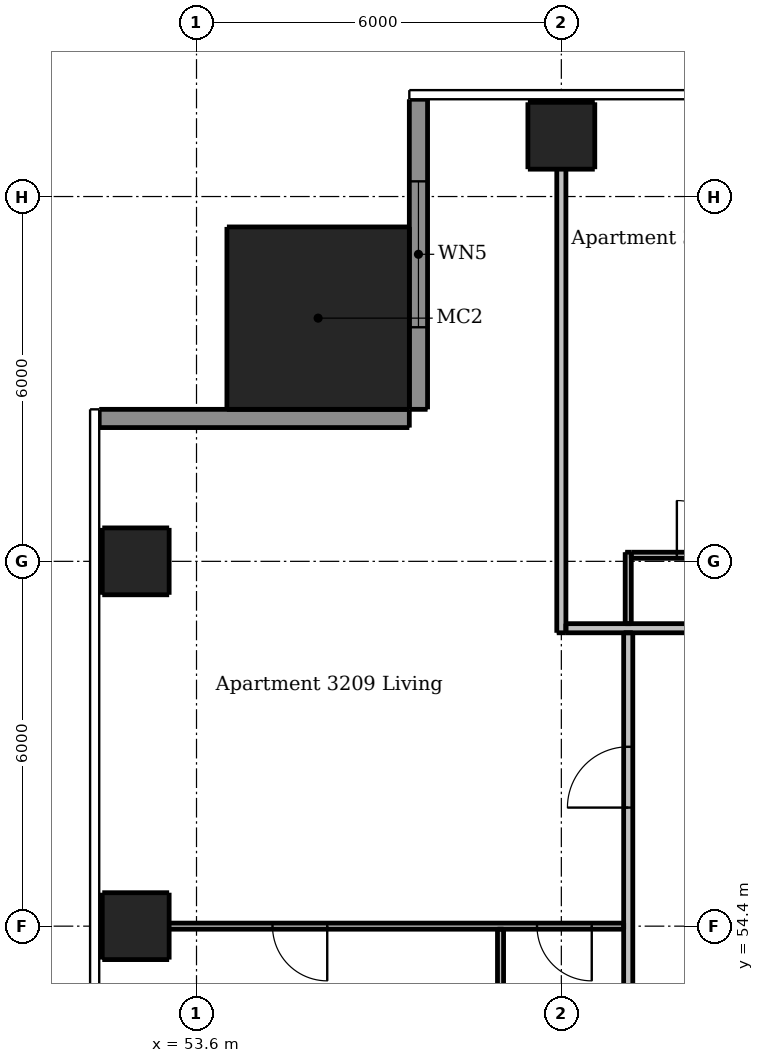
"""IFC4 building model, lengths in metres.
Left out: names, types, materials, properties, quantities, classifications, styles, units other than length and angle.
Written with IfcOpenShell. Run it as: python <this file> out.ifc"""

import sys

from ifc_helpers import new_model, si_unit, direction, frame, frame_2d, origin, origin_2d, place, context, subcontext, project, spatial, rectangle, extrude, element, fill, save


model = new_model("IFC4")
c1 = context("Model", 3, precision=1e-05, world=origin(), true_north=direction((0.0, 1.0)))
c2 = subcontext(c1, "Body", "Model", "MODEL_VIEW")
j1 = project(units=[si_unit("LENGTHUNIT", "METRE"), si_unit("PLANEANGLEUNIT", "RADIAN")], contexts=[c1])
p1 = place(None, origin())
s1 = spatial("IfcSite", under=j1, at=p1, CompositionType="ELEMENT")
p2 = place(p1, origin())
s2 = spatial("IfcBuilding", under=s1, at=p2, CompositionType="ELEMENT")
p3 = place(p2, frame((0.0, 0.0, 118.3)))
s3 = spatial("IfcBuildingStorey", under=s2, at=p3, CompositionType="ELEMENT", Elevation=118.3)
for number, where, z_axis, x_axis in (
    (1, (59.6, 67.4, 0.0), (0.0, 0.0, 1.0), (1.0, 0.0, 0.0)),
    (2, (52.6, 54.4, 0.0), (0.0, 0.0, 1.0), (1.0, 0.0, 0.0)),
    (3, (52.6, 60.4, 0.0), (0.0, 0.0, 1.0), (1.0, 0.0, 0.0)),
):
    element("IfcColumn", number, at=place(p3, frame(where, z_axis=z_axis, x_axis=x_axis)), inside=s3, PredefinedType="COLUMN", context=c2, shape_type="SweptSolid", body=[
        extrude(rectangle(XDim=1.1, YDim=1.1, at=origin_2d()), origin(), (0.0, 0.0, 1.0), 3.05),
    ])
p4 = place(p3, frame((55.6, 64.4, 0.0), z_axis=(0.0, 0.0, 1.0), x_axis=(1.0, 0.0, 0.0)))
e4 = element("IfcColumn", 4, at=p4, inside=s3, PredefinedType="COLUMN", context=c2, shape_type="SweptSolid", body=[
    extrude(rectangle(XDim=3.0, YDim=3.0, at=origin_2d()), origin(), (0.0, 0.0, 1.0), 3.3),
])
p5 = place(p3, frame((57.25, 68.0, 0.0), z_axis=(0.0, 0.0, 1.0), x_axis=(0.0, -1.0, 0.0)))
e5 = element("IfcWall", 5, at=p5, inside=s3, PredefinedType="SOLIDWALL", context=c2, shape_type="SweptSolid", body=[
    extrude(rectangle(XDim=5.1, YDim=0.3, at=frame_2d((2.55, 0.0))), origin(), (0.0, 0.0, 1.0), 3.05),
])
p6 = place(p5, frame((1.35, 0.0, 0.15)))
e6 = element("IfcOpeningElement", 6, at=p6, cuts=e5, PredefinedType="OPENING", context=c2, shape_type="SweptSolid", body=[
    extrude(rectangle(XDim=2.4, YDim=2.1, at=frame_2d((1.2, 1.05))), frame((0.0, 0.16, 0.0), z_axis=(0.0, -1.0, 0.0), x_axis=(1.0, 0.0, 0.0)), (0.0, 0.0, 1.0), 0.32),
])
p7 = place(p3, frame((57.1, 62.75, 0.0), z_axis=(0.0, 0.0, 1.0), x_axis=(-1.0, 0.0, 0.0)))
e7 = element("IfcWall", 7, at=p7, inside=s3, PredefinedType="SOLIDWALL", context=c2, shape_type="SweptSolid", body=[
    extrude(rectangle(XDim=5.1, YDim=0.3, at=frame_2d((2.55, 0.0))), origin(), (0.0, 0.0, 1.0), 3.05),
])
p8 = place(p3, frame((58.6, 54.35, 0.0), z_axis=(0.0, 0.0, 1.0), x_axis=(0.0, -1.0, 0.0)))
e8 = element("IfcWall", 8, at=p8, inside=s3, PredefinedType="PARTITIONING", context=c2, shape_type="SweptSolid", body=[
    extrude(rectangle(XDim=5.875, YDim=0.1, at=frame_2d((2.938, 0.0))), origin(), (0.0, 0.0, 1.0), 3.05),
])
p9 = place(p8, frame((3.75, 0.0, 0.0)))
e9 = element("IfcOpeningElement", 9, at=p9, cuts=e8, PredefinedType="OPENING", context=c2, shape_type="SweptSolid", body=[
    extrude(rectangle(XDim=0.8, YDim=2.1, at=frame_2d((0.4, 1.05))), frame((0.0, 0.06, 0.0), z_axis=(0.0, -1.0, 0.0), x_axis=(1.0, 0.0, 0.0)), (0.0, 0.0, 1.0), 0.12),
])
p10 = place(p3, frame((60.7, 59.375, 0.0), z_axis=(0.0, 0.0, 1.0), x_axis=(0.0, 1.0, 0.0)))
e10 = element("IfcWall", 10, at=p10, inside=s3, PredefinedType="PARTITIONING", context=c2, shape_type="SweptSolid", body=[
    extrude(rectangle(XDim=1.175, YDim=0.1, at=frame_2d((0.587, 0.0))), origin(), (0.0, 0.0, 1.0), 3.05),
])
p11 = place(p3, frame((60.75, 60.5, 0.0), z_axis=(0.0, 0.0, 1.0), x_axis=(1.0, 0.0, 0.0)))
e11 = element("IfcWall", 11, at=p11, inside=s3, PredefinedType="PARTITIONING", context=c2, shape_type="SweptSolid", body=[
    extrude(rectangle(XDim=16.775, YDim=0.1, at=frame_2d((8.387, 0.0))), origin(), (0.0, 0.0, 1.0), 3.05),
])
p12 = place(p11, frame((9.8, 0.0, 0.0)))
e12 = element("IfcOpeningElement", 12, at=p12, cuts=e11, PredefinedType="OPENING", context=c2, shape_type="SweptSolid", body=[
    extrude(rectangle(XDim=0.9, YDim=2.1, at=frame_2d((0.45, 1.05))), frame((0.0, 0.06, 0.0), z_axis=(0.0, -1.0, 0.0), x_axis=(1.0, 0.0, 0.0)), (0.0, 0.0, 1.0), 0.12),
])
p13 = place(p11, frame((14.9, 0.0, 0.0)))
e13 = element("IfcOpeningElement", 13, at=p13, cuts=e11, PredefinedType="OPENING", context=c2, shape_type="SweptSolid", body=[
    extrude(rectangle(XDim=0.9, YDim=2.1, at=frame_2d((0.45, 1.05))), frame((0.0, 0.06, 0.0), z_axis=(0.0, -1.0, 0.0), x_axis=(1.0, 0.0, 0.0)), (0.0, 0.0, 1.0), 0.12),
])
p14 = place(p11, frame((12.5, 0.0, 0.0)))
e14 = element("IfcOpeningElement", 14, at=p14, cuts=e11, PredefinedType="OPENING", context=c2, shape_type="SweptSolid", body=[
    extrude(rectangle(XDim=0.9, YDim=2.1, at=frame_2d((0.45, 1.05))), frame((0.0, 0.06, 0.0), z_axis=(0.0, -1.0, 0.0), x_axis=(1.0, 0.0, 0.0)), (0.0, 0.0, 1.0), 0.12),
])
p15 = place(p11, frame((5.3, 0.0, 0.0)))
e15 = element("IfcOpeningElement", 15, at=p15, cuts=e11, PredefinedType="OPENING", context=c2, shape_type="SweptSolid", body=[
    extrude(rectangle(XDim=0.9, YDim=2.1, at=frame_2d((0.45, 1.05))), frame((0.0, 0.06, 0.0), z_axis=(0.0, -1.0, 0.0), x_axis=(1.0, 0.0, 0.0)), (0.0, 0.0, 1.0), 0.12),
])
p16 = place(p11, frame((7.15, 0.0, 0.0)))
e16 = element("IfcOpeningElement", 16, at=p16, cuts=e11, PredefinedType="OPENING", context=c2, shape_type="SweptSolid", body=[
    extrude(rectangle(XDim=0.8, YDim=2.1, at=frame_2d((0.4, 1.05))), frame((0.0, 0.06, 0.0), z_axis=(0.0, -1.0, 0.0), x_axis=(1.0, 0.0, 0.0)), (0.0, 0.0, 1.0), 0.12),
])
p17 = place(p11, frame((0.75, 0.0, 0.0)))
e17 = element("IfcOpeningElement", 17, at=p17, cuts=e11, PredefinedType="OPENING", context=c2, shape_type="SweptSolid", body=[
    extrude(rectangle(XDim=0.9, YDim=2.1, at=frame_2d((0.45, 1.05))), frame((0.0, 0.06, 0.0), z_axis=(0.0, -1.0, 0.0), x_axis=(1.0, 0.0, 0.0)), (0.0, 0.0, 1.0), 0.12),
])
p18 = place(p11, frame((3.25, 0.0, 0.0)))
e18 = element("IfcOpeningElement", 18, at=p18, cuts=e11, PredefinedType="OPENING", context=c2, shape_type="SweptSolid", body=[
    extrude(rectangle(XDim=0.8, YDim=2.1, at=frame_2d((0.4, 1.05))), frame((0.0, 0.06, 0.0), z_axis=(0.0, -1.0, 0.0), x_axis=(1.0, 0.0, 0.0)), (0.0, 0.0, 1.0), 0.12),
])
p19 = place(p3, frame((60.625, 54.4, 0.0), z_axis=(0.0, 0.0, 1.0), x_axis=(-1.0, 0.0, 0.0)))
e19 = element("IfcWall", 19, at=p19, inside=s3, PredefinedType="PARTITIONING", context=c2, shape_type="SweptSolid", body=[
    extrude(rectangle(XDim=8.625, YDim=0.1, at=frame_2d((4.312, 0.0))), origin(), (0.0, 0.0, 1.0), 2.516),
])
p20 = place(p19, frame((0.525, 0.0, 0.0)))
e20 = element("IfcOpeningElement", 20, at=p20, cuts=e19, PredefinedType="OPENING", context=c2, shape_type="SweptSolid", body=[
    extrude(rectangle(XDim=0.9, YDim=2.1, at=frame_2d((0.45, 1.05))), frame((0.0, 0.06, 0.0), z_axis=(0.0, -1.0, 0.0), x_axis=(1.0, 0.0, 0.0)), (0.0, 0.0, 1.0), 0.12),
])
p21 = place(p19, frame((4.875, 0.0, 0.0)))
e21 = element("IfcOpeningElement", 21, at=p21, cuts=e19, PredefinedType="OPENING", context=c2, shape_type="SweptSolid", body=[
    extrude(rectangle(XDim=0.9, YDim=2.1, at=frame_2d((0.45, 1.05))), frame((0.0, 0.06, 0.0), z_axis=(0.0, -1.0, 0.0), x_axis=(1.0, 0.0, 0.0)), (0.0, 0.0, 1.0), 0.12),
])
p22 = place(p3, frame((59.6, 59.225, 0.0), z_axis=(0.0, 0.0, 1.0), x_axis=(0.0, 1.0, 0.0)))
e22 = element("IfcWall", 22, at=p22, inside=s3, PredefinedType="PARTITIONING", context=c2, shape_type="SweptSolid", body=[
    extrude(rectangle(XDim=8.775, YDim=0.15, at=frame_2d((4.387, 0.0))), origin(), (0.0, 0.0, 1.0), 2.51),
])
p23 = place(p3, frame((60.7, 30.325, 0.0), z_axis=(0.0, 0.0, 1.0), x_axis=(0.0, 1.0, 0.0)))
e23 = element("IfcWall", 23, at=p23, inside=s3, PredefinedType="PARTITIONING", context=c2, shape_type="SweptSolid", body=[
    extrude(rectangle(XDim=28.9, YDim=0.15, at=frame_2d((14.45, 0.0))), origin(), (0.0, 0.0, 1.0), 3.05),
])
p24 = place(p23, frame((9.225, 0.0, 0.0)))
e24 = element("IfcOpeningElement", 24, at=p24, cuts=e23, PredefinedType="OPENING", context=c2, shape_type="SweptSolid", body=[
    extrude(rectangle(XDim=1.0, YDim=2.1, at=frame_2d((0.5, 1.05))), frame((0.0, 0.085, 0.0), z_axis=(0.0, -1.0, 0.0), x_axis=(1.0, 0.0, 0.0)), (0.0, 0.0, 1.0), 0.17),
])
p25 = place(p23, frame((26.025, 0.0, 0.0)))
e25 = element("IfcOpeningElement", 25, at=p25, cuts=e23, PredefinedType="OPENING", context=c2, shape_type="SweptSolid", body=[
    extrude(rectangle(XDim=1.0, YDim=2.1, at=frame_2d((0.5, 1.05))), frame((0.0, 0.085, 0.0), z_axis=(0.0, -1.0, 0.0), x_axis=(1.0, 0.0, 0.0)), (0.0, 0.0, 1.0), 0.17),
])
p26 = place(p3, frame((59.675, 59.3, 0.0), z_axis=(0.0, 0.0, 1.0), x_axis=(1.0, 0.0, 0.0)))
e26 = element("IfcWall", 26, at=p26, inside=s3, PredefinedType="PARTITIONING", context=c2, shape_type="SweptSolid", body=[
    extrude(rectangle(XDim=28.55, YDim=0.15, at=frame_2d((14.275, 0.0))), origin(), (0.0, 0.0, 1.0), 3.05),
])
p27 = place(p26, frame((8.975, 0.0, 0.0)))
e27 = element("IfcOpeningElement", 27, at=p27, cuts=e26, PredefinedType="OPENING", context=c2, shape_type="SweptSolid", body=[
    extrude(rectangle(XDim=1.0, YDim=2.1, at=frame_2d((0.5, 1.05))), frame((0.0, 0.085, 0.0), z_axis=(0.0, -1.0, 0.0), x_axis=(1.0, 0.0, 0.0)), (0.0, 0.0, 1.0), 0.17),
])
p28 = place(p26, frame((25.775, 0.0, 0.0)))
e28 = element("IfcOpeningElement", 28, at=p28, cuts=e26, PredefinedType="OPENING", context=c2, shape_type="SweptSolid", body=[
    extrude(rectangle(XDim=1.0, YDim=2.1, at=frame_2d((0.5, 1.05))), frame((0.0, 0.085, 0.0), z_axis=(0.0, -1.0, 0.0), x_axis=(1.0, 0.0, 0.0)), (0.0, 0.0, 1.0), 0.17),
])
p29 = place(p6, origin())
e29 = element("IfcWindow", 29, at=p29, inside=s3, PartitioningType="DOUBLE_PANEL_VERTICAL", PredefinedType="WINDOW", context=c2, shape_type="SweptSolid", body=[
    extrude(rectangle(XDim=2.4, YDim=2.1, at=frame_2d((1.2, 1.05))), frame((0.0, 0.03, 0.0), z_axis=(0.0, -1.0, 0.0), x_axis=(1.0, 0.0, 0.0)), (0.0, 0.0, 1.0), 0.06),
])
fill(e6, e29)
p30 = place(p17, origin())
e30 = element("IfcDoor", 30, at=p30, inside=s3, OperationType="SINGLE_SWING_LEFT", PredefinedType="DOOR", context=c2, shape_type="SweptSolid", body=[
    extrude(rectangle(XDim=0.9, YDim=2.1, at=frame_2d((0.45, 1.05))), frame((0.0, 0.025, 0.0), z_axis=(0.0, -1.0, 0.0), x_axis=(1.0, 0.0, 0.0)), (0.0, 0.0, 1.0), 0.05),
])
fill(e17, e30)
p31 = place(p25, origin())
e31 = element("IfcDoor", 31, at=p31, inside=s3, OperationType="SINGLE_SWING_LEFT", PredefinedType="DOOR", context=c2, shape_type="SweptSolid", body=[
    extrude(rectangle(XDim=1.0, YDim=2.1, at=frame_2d((0.5, 1.05))), frame((0.0, 0.025, 0.0), z_axis=(0.0, -1.0, 0.0), x_axis=(1.0, 0.0, 0.0)), (0.0, 0.0, 1.0), 0.05),
])
fill(e25, e31)
p32 = place(p20, origin())
e32 = element("IfcDoor", 32, at=p32, inside=s3, OperationType="SINGLE_SWING_LEFT", PredefinedType="DOOR", context=c2, shape_type="SweptSolid", body=[
    extrude(rectangle(XDim=0.9, YDim=2.1, at=frame_2d((0.45, 1.05))), frame((0.0, 0.025, 0.0), z_axis=(0.0, -1.0, 0.0), x_axis=(1.0, 0.0, 0.0)), (0.0, 0.0, 1.0), 0.05),
])
fill(e20, e32)
p33 = place(p21, origin())
e33 = element("IfcDoor", 33, at=p33, inside=s3, OperationType="SINGLE_SWING_LEFT", PredefinedType="DOOR", context=c2, shape_type="SweptSolid", body=[
    extrude(rectangle(XDim=0.9, YDim=2.1, at=frame_2d((0.45, 1.05))), frame((0.0, 0.025, 0.0), z_axis=(0.0, -1.0, 0.0), x_axis=(1.0, 0.0, 0.0)), (0.0, 0.0, 1.0), 0.05),
])
fill(e21, e33)
save(model, sys.argv[1])
